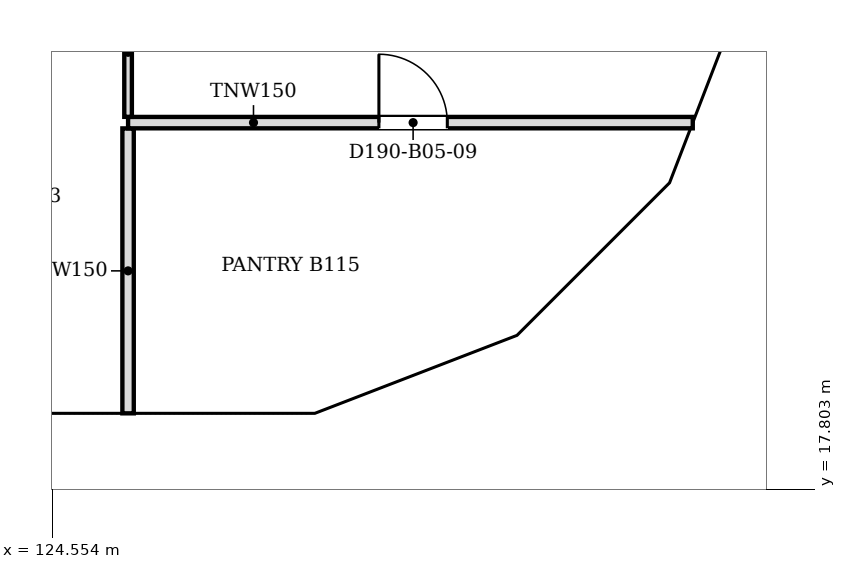
"""IFC4 building model, lengths in metres.
Left out: names, types, materials, properties, quantities, classifications, styles, units other than length and angle.
Written with IfcOpenShell. Run it as: python <this file> out.ifc"""

import sys

from ifc_helpers import new_model, si_unit, direction, frame, frame_2d, origin, place, context, subcontext, project, spatial, polyline, rectangle, outline, extrude, faceted_brep, source, transform, mapped, element, fill, save


model = new_model("IFC4")
c1 = context("Model", 3, precision=1e-05, world=origin(), true_north=direction((0.0, 1.0)))
c2 = subcontext(c1, "Body", "Model", "MODEL_VIEW")
j1 = project(units=[si_unit("LENGTHUNIT", "METRE"), si_unit("PLANEANGLEUNIT", "RADIAN")], contexts=[c1])
p1 = place(None, origin())
s1 = spatial("IfcSite", under=j1, at=p1, CompositionType="ELEMENT")
p2 = place(p1, origin())
s2 = spatial("IfcBuilding", under=s1, at=p2, CompositionType="ELEMENT")
p3 = place(p2, frame((0.0, 0.0, 48.6)))
s3 = spatial("IfcBuildingStorey", under=s2, at=p3, CompositionType="ELEMENT", Elevation=48.6)
m1 = source(origin(), c2, "Body", "SweptSolid", [
    extrude(outline(polyline([(3.05, 0.0), (6.1, 3.8), (3.05, 7.6), (0.0, 3.8), (3.05, 0.0)])), frame((0.0, 0.25, 0.0), z_axis=(0.0, -1.0, 0.0), x_axis=(1.0, 0.0, 0.0)), (0.0, 0.0, 1.0), 0.5),
])
p4 = place(p3, frame((118.95, 18.55, -3.8), z_axis=(0.0, 0.0, 1.0), x_axis=(1.0, 0.0, 0.0)))
e1 = element("IfcWall", 1, at=p4, inside=s3, PredefinedType="SOLIDWALL", context=c2, shape_type="MappedRepresentation", body=[
    mapped(m1, transform((0.0, 0.0, 0.0), scale=1.0)),
])
m2 = source(origin(), c2, "Body", "SweptSolid", [
    extrude(outline(polyline([(3.05, 0.399), (5.78, 3.8), (3.05, 7.2), (0.321, 3.8), (3.05, 0.399)])), frame((0.0, 0.26, 0.0), z_axis=(0.0, -1.0, 0.0), x_axis=(1.0, 0.0, 0.0)), (0.0, 0.0, 1.0), 0.52),
])
p5 = place(p4, origin())
e2 = element("IfcOpeningElement", 2, at=p5, cuts=e1, PredefinedType="OPENING", context=c2, shape_type="MappedRepresentation", body=[
    mapped(m2, transform((0.0, 0.0, 0.0), scale=1.0)),
])
m3 = source(origin(), c2, "Body", "Brep", [
    faceted_brep([(3.003, -0.25, 0.0), (3.05, -0.25, 0.06), (3.05, -0.25, 7.54), (3.003, -0.25, 7.6), (0.0, -0.25, 3.8), (0.0, 0.25, 3.8), (2.957, 0.25, 7.541), (2.957, 0.25, 0.059), (3.003, 0.0, 0.0), (3.003, 0.0, 7.6)], [[[0, 1, 2, 3, 4]], [[5, 6, 7]], [[1, 0, 8]], [[9, 3, 2]], [[6, 5, 4, 3, 9]], [[5, 7, 8, 0, 4]], [[1, 8, 7, 6, 9, 2]]]),
])
p6 = place(p3, frame((125.05, 18.55, -3.8), z_axis=(0.0, 0.0, 1.0), x_axis=(1.0, 0.0, 0.0)))
e3 = element("IfcWall", 3, at=p6, inside=s3, PredefinedType="SOLIDWALL", context=c2, shape_type="MappedRepresentation", body=[
    mapped(m3, transform((0.0, 0.0, 0.0), scale=1.0)),
])
m4 = source(origin(), c2, "Body", "SweptSolid", [
    extrude(outline(polyline([(2.803, 6.944), (0.319, 3.8), (2.803, 0.656), (2.803, 6.944)])), frame((0.0, 0.26, 0.0), z_axis=(0.0, -1.0, 0.0), x_axis=(1.0, 0.0, 0.0)), (0.0, 0.0, 1.0), 0.52),
])
p7 = place(p6, origin())
e4 = element("IfcOpeningElement", 4, at=p7, cuts=e3, PredefinedType="OPENING", context=c2, shape_type="MappedRepresentation", body=[
    mapped(m4, transform((0.0, 0.0, 0.0), scale=1.0)),
])
m5 = source(origin(), c2, "Body", "Brep", [
    faceted_brep([(0.047, -0.25, 0.0), (2.997, -0.25, 3.8), (0.047, -0.25, 7.6), (0.0, -0.25, 7.541), (0.0, -0.25, 0.059), (0.093, 0.25, 7.54), (2.944, 0.25, 3.868), (2.944, 0.25, 3.732), (0.093, 0.25, 0.06), (2.997, 0.0, 3.8), (0.047, 0.0, 0.0), (0.047, 0.0, 7.6)], [[[0, 1, 2, 3, 4]], [[5, 6, 7, 8]], [[8, 7, 9, 1, 0, 10]], [[6, 5, 11, 2, 1, 9]], [[3, 2, 11]], [[10, 0, 4]], [[8, 10, 4, 3, 11, 5]], [[7, 6, 9]]]),
])
p8 = place(p3, frame((128.01, 18.533, -3.8), z_axis=(0.0, 0.0, 1.0), x_axis=(0.932990326376, 0.359901446078, 0.0)))
e5 = element("IfcWall", 5, at=p8, inside=s3, PredefinedType="SOLIDWALL", context=c2, shape_type="MappedRepresentation", body=[
    mapped(m5, transform((0.0, 0.0, 0.0), scale=1.0)),
])
m6 = source(origin(), c2, "Body", "SweptSolid", [
    extrude(outline(polyline([(0.247, 0.665), (2.681, 3.8), (0.247, 6.935), (0.247, 0.665)])), frame((0.0, 0.26, 0.0), z_axis=(0.0, -1.0, 0.0), x_axis=(1.0, 0.0, 0.0)), (0.0, 0.0, 1.0), 0.52),
])
p9 = place(p8, origin())
e6 = element("IfcOpeningElement", 6, at=p9, cuts=e5, PredefinedType="OPENING", context=c2, shape_type="MappedRepresentation", body=[
    mapped(m6, transform((0.0, 0.0, 0.0), scale=1.0)),
])
m7 = source(origin(), c2, "Body", "Brep", [
    faceted_brep([(2.944, -0.25, 0.0), (2.997, -0.25, 0.068), (2.997, -0.25, 7.532), (2.944, -0.25, 7.6), (0.0, -0.25, 3.8), (0.053, 0.25, 3.868), (2.891, 0.25, 7.532), (2.891, 0.25, 0.068), (0.053, 0.25, 3.732), (2.944, 0.0, 0.0), (2.944, 0.0, 7.6), (0.0, 0.0, 3.8)], [[[0, 1, 2, 3, 4]], [[5, 6, 7, 8]], [[1, 0, 9]], [[10, 3, 2]], [[6, 5, 11, 4, 3, 10]], [[8, 7, 9, 0, 4, 11]], [[8, 11, 5]], [[1, 9, 7, 6, 10, 2]]]),
])
p10 = place(p3, frame((130.806, 19.612, -3.8), z_axis=(0.0, 0.0, 1.0), x_axis=(0.707106781187, 0.707106781187, 0.0)))
e7 = element("IfcWall", 7, at=p10, inside=s3, PredefinedType="SOLIDWALL", context=c2, shape_type="MappedRepresentation", body=[
    mapped(m7, transform((0.0, 0.0, 0.0), scale=1.0)),
])
m8 = source(origin(), c2, "Body", "SweptSolid", [
    extrude(outline(polyline([(2.744, 6.934), (0.316, 3.8), (2.744, 0.666), (2.744, 6.934)])), frame((0.0, 0.26, 0.0), z_axis=(0.0, -1.0, 0.0), x_axis=(1.0, 0.0, 0.0)), (0.0, 0.0, 1.0), 0.52),
])
p11 = place(p10, origin())
e8 = element("IfcOpeningElement", 8, at=p11, cuts=e7, PredefinedType="OPENING", context=c2, shape_type="MappedRepresentation", body=[
    mapped(m8, transform((0.0, 0.0, 0.0), scale=1.0)),
])
m9 = source(origin(), c2, "Body", "Brep", [
    faceted_brep([(0.053, -0.25, 0.0), (3.003, -0.25, 3.8), (0.053, -0.25, 7.6), (0.0, -0.25, 7.531), (0.0, -0.25, 0.068), (0.106, 0.25, 7.532), (2.957, 0.25, 3.86), (2.957, 0.25, 3.74), (0.106, 0.25, 0.068), (3.003, 0.0, 3.8), (0.053, 0.0, 0.0), (0.053, 0.0, 7.6)], [[[0, 1, 2, 3, 4]], [[5, 6, 7, 8]], [[8, 7, 9, 1, 0, 10]], [[6, 5, 11, 2, 1, 9]], [[3, 2, 11]], [[10, 0, 4]], [[8, 10, 4, 3, 11, 5]], [[7, 6, 9]]]),
])
p12 = place(p3, frame((132.869, 21.644, -3.8), z_axis=(0.0, 0.0, 1.0), x_axis=(0.359855894603, 0.933007896601, 0.0)))
e9 = element("IfcWall", 9, at=p12, inside=s3, PredefinedType="SOLIDWALL", context=c2, shape_type="MappedRepresentation", body=[
    mapped(m9, transform((0.0, 0.0, 0.0), scale=1.0)),
])
m10 = source(origin(), c2, "Body", "SweptSolid", [
    extrude(outline(polyline([(0.253, 0.665), (2.687, 3.8), (0.253, 6.935), (0.253, 0.665)])), frame((0.0, 0.26, 0.0), z_axis=(0.0, -1.0, 0.0), x_axis=(1.0, 0.0, 0.0)), (0.0, 0.0, 1.0), 0.52),
])
p13 = place(p12, origin())
e10 = element("IfcOpeningElement", 10, at=p13, cuts=e9, PredefinedType="OPENING", context=c2, shape_type="MappedRepresentation", body=[
    mapped(m10, transform((0.0, 0.0, 0.0), scale=1.0)),
])
p14 = place(p2, frame((0.0, 0.0, 52.4)))
s4 = spatial("IfcBuildingStorey", under=s2, at=p14, CompositionType="ELEMENT", Elevation=52.4)
m11 = source(origin(), c2, "Body", "Brep", [
    faceted_brep([(3.05, -0.25, 0.0), (6.053, -0.25, 3.8), (3.05, -0.25, 7.6), (0.0, -0.25, 3.8), (0.0, 0.25, 3.8), (3.05, 0.25, 7.6), (6.007, 0.25, 3.859), (6.007, 0.25, 3.741), (3.05, 0.25, 0.0), (6.053, 0.0, 3.8)], [[[0, 1, 2, 3]], [[4, 5, 6, 7, 8]], [[8, 7, 9, 1, 0]], [[6, 5, 2, 1, 9]], [[5, 4, 3, 2]], [[4, 8, 0, 3]], [[9, 7, 6]]]),
])
p15 = place(p14, frame((122.0, 18.55, -3.8), z_axis=(0.0, 0.0, 1.0), x_axis=(1.0, 0.0, 0.0)))
e11 = element("IfcWall", 11, at=p15, inside=s4, PredefinedType="SOLIDWALL", context=c2, shape_type="MappedRepresentation", body=[
    mapped(m11, transform((0.0, 0.0, 0.0), scale=1.0)),
])
m12 = source(origin(), c2, "Body", "SweptSolid", [
    extrude(outline(polyline([(3.049, 0.401), (5.735, 3.8), (3.049, 7.199), (0.321, 3.8), (3.049, 0.401)])), frame((0.0, 0.26, 0.0), z_axis=(0.0, -1.0, 0.0), x_axis=(1.0, 0.0, 0.0)), (0.0, 0.0, 1.0), 0.52),
])
p16 = place(p15, origin())
e12 = element("IfcOpeningElement", 12, at=p16, cuts=e11, PredefinedType="OPENING", context=c2, shape_type="MappedRepresentation", body=[
    mapped(m12, transform((0.0, 0.0, 0.0), scale=1.0)),
])
m13 = source(origin(), c2, "Body", "Brep", [
    faceted_brep([(2.95, -0.25, 0.0), (3.003, -0.25, 0.068), (3.003, -0.25, 7.531), (2.95, -0.25, 7.6), (0.0, -0.25, 3.8), (0.047, 0.25, 3.86), (2.898, 0.25, 7.532), (2.898, 0.25, 0.068), (0.047, 0.25, 3.74), (2.95, 0.0, 0.0), (2.95, 0.0, 7.6), (0.0, 0.0, 3.8)], [[[0, 1, 2, 3, 4]], [[5, 6, 7, 8]], [[1, 0, 9]], [[10, 3, 2]], [[6, 5, 11, 4, 3, 10]], [[8, 7, 9, 0, 4, 11]], [[8, 11, 5]], [[1, 9, 7, 6, 10, 2]]]),
])
p17 = place(p14, frame((128.053, 18.55, -3.8), z_axis=(0.0, 0.0, 1.0), x_axis=(0.933007896601, 0.359855894603, 0.0)))
e13 = element("IfcWall", 13, at=p17, inside=s4, PredefinedType="SOLIDWALL", context=c2, shape_type="MappedRepresentation", body=[
    mapped(m13, transform((0.0, 0.0, 0.0), scale=1.0)),
])
m14 = source(origin(), c2, "Body", "SweptSolid", [
    extrude(outline(polyline([(2.75, 6.935), (0.316, 3.8), (2.75, 0.665), (2.75, 6.935)])), frame((0.0, 0.26, 0.0), z_axis=(0.0, -1.0, 0.0), x_axis=(1.0, 0.0, 0.0)), (0.0, 0.0, 1.0), 0.52),
])
p18 = place(p17, origin())
e14 = element("IfcOpeningElement", 14, at=p18, cuts=e13, PredefinedType="OPENING", context=c2, shape_type="MappedRepresentation", body=[
    mapped(m14, transform((0.0, 0.0, 0.0), scale=1.0)),
])
m15 = source(origin(), c2, "Body", "Brep", [
    faceted_brep([(0.053, -0.25, 0.0), (2.997, -0.25, 3.8), (0.053, -0.25, 7.6), (0.0, -0.25, 7.532), (0.0, -0.25, 0.068), (0.106, 0.25, 7.531), (2.944, 0.25, 3.868), (2.944, 0.25, 3.732), (0.106, 0.25, 0.068), (2.997, 0.0, 3.8), (0.053, 0.0, 0.0), (0.053, 0.0, 7.6)], [[[0, 1, 2, 3, 4]], [[5, 6, 7, 8]], [[8, 7, 9, 1, 0, 10]], [[6, 5, 11, 2, 1, 9]], [[3, 2, 11]], [[10, 0, 4]], [[8, 10, 4, 3, 11, 5]], [[9, 7, 6]]]),
])
p19 = place(p14, frame((130.769, 19.574, -3.8), z_axis=(0.0, 0.0, 1.0), x_axis=(0.707106781187, 0.707106781187, 0.0)))
e15 = element("IfcWall", 15, at=p19, inside=s4, PredefinedType="SOLIDWALL", context=c2, shape_type="MappedRepresentation", body=[
    mapped(m15, transform((0.0, 0.0, 0.0), scale=1.0)),
])
m16 = source(origin(), c2, "Body", "SweptSolid", [
    extrude(outline(polyline([(0.253, 0.666), (2.681, 3.8), (0.253, 6.934), (0.253, 0.666)])), frame((0.0, 0.26, 0.0), z_axis=(0.0, -1.0, 0.0), x_axis=(1.0, 0.0, 0.0)), (0.0, 0.0, 1.0), 0.52),
])
p20 = place(p19, origin())
e16 = element("IfcOpeningElement", 16, at=p20, cuts=e15, PredefinedType="OPENING", context=c2, shape_type="MappedRepresentation", body=[
    mapped(m16, transform((0.0, 0.0, 0.0), scale=1.0)),
])
m17 = source(origin(), c2, "Body", "Brep", [
    faceted_brep([(2.95, -0.25, 0.0), (2.997, -0.25, 0.059), (2.997, -0.25, 7.541), (2.95, -0.25, 7.6), (0.0, -0.25, 3.8), (0.053, 0.25, 3.868), (2.904, 0.25, 7.54), (2.904, 0.25, 0.06), (0.053, 0.25, 3.732), (2.95, 0.0, 0.0), (2.95, 0.0, 7.6), (0.0, 0.0, 3.8)], [[[0, 1, 2, 3, 4]], [[5, 6, 7, 8]], [[1, 0, 9]], [[10, 3, 2]], [[6, 5, 11, 4, 3, 10]], [[8, 7, 9, 0, 4, 11]], [[8, 11, 5]], [[1, 9, 7, 6, 10, 2]]]),
])
p21 = place(p14, frame((132.888, 21.694, -3.8), z_axis=(0.0, 0.0, 1.0), x_axis=(0.359901446078, 0.932990326376, 0.0)))
e17 = element("IfcWall", 17, at=p21, inside=s4, PredefinedType="SOLIDWALL", context=c2, shape_type="MappedRepresentation", body=[
    mapped(m17, transform((0.0, 0.0, 0.0), scale=1.0)),
])
p22 = place(p21, origin())
e18 = element("IfcOpeningElement", 18, at=p22, cuts=e17, PredefinedType="OPENING", context=c2, shape_type="MappedRepresentation", body=[
    mapped(m14, transform((0.0, 0.0, 0.0), scale=1.0)),
])
p23 = place(p3, frame((125.55, 18.8, 0.0), z_axis=(0.0, 0.0, 1.0), x_axis=(0.0, 1.0, 0.0)))
e19 = element("IfcWall", 19, at=p23, inside=s3, PredefinedType="PARTITIONING", context=c2, shape_type="SweptSolid", body=[
    extrude(rectangle(XDim=3.749, YDim=0.15, at=frame_2d((1.875, 0.0))), origin(), (0.0, 0.0, 1.0), 3.067),
])
p24 = place(p3, frame((132.979, 22.625, 0.0), z_axis=(0.0, 0.0, 1.0), x_axis=(-1.0, 0.0, 0.0)))
e20 = element("IfcWall", 20, at=p24, inside=s3, PredefinedType="PARTITIONING", context=c2, shape_type="SweptSolid", body=[
    extrude(rectangle(XDim=7.429, YDim=0.15, at=frame_2d((3.715, 0.0))), origin(), (0.0, 0.0, 1.0), 3.067),
])
m18 = source(origin(), c2, "Body", "SweptSolid", [
    extrude(rectangle(XDim=0.9, YDim=2.1, at=frame_2d((0.45, 1.05))), frame((0.0, 0.085, 0.0), z_axis=(0.0, -1.0, 0.0), x_axis=(1.0, 0.0, 0.0)), (0.0, 0.0, 1.0), 0.17),
])
p25 = place(p24, frame((3.229, 0.0, 0.0)))
e21 = element("IfcOpeningElement", 21, at=p25, cuts=e20, PredefinedType="OPENING", context=c2, shape_type="MappedRepresentation", body=[
    mapped(m18, transform((0.0, 0.0, 0.0), scale=1.0)),
])
p26 = place(p3, frame((125.55, 22.701, 0.0), z_axis=(0.0, 0.0, 1.0), x_axis=(0.0, 1.0, 0.0)))
e22 = element("IfcWall", 22, at=p26, inside=s3, PredefinedType="PARTITIONING", context=c2, shape_type="SweptSolid", body=[
    extrude(rectangle(XDim=1.698, YDim=0.1, at=frame_2d((0.849, 0.0))), origin(), (0.0, 0.0, 1.0), 3.067),
])
m19 = source(origin(), c2, "Body", "SweptSolid", [
    extrude(rectangle(XDim=0.9, YDim=2.1, at=frame_2d((0.45, 1.05))), frame((0.0, 0.025, 0.0), z_axis=(0.0, -1.0, 0.0), x_axis=(1.0, 0.0, 0.0)), (0.0, 0.0, 1.0), 0.05),
])
p27 = place(p25, origin())
e23 = element("IfcDoor", 23, at=p27, inside=s3, OperationType="SINGLE_SWING_RIGHT", PredefinedType="DOOR", context=c2, shape_type="MappedRepresentation", body=[
    mapped(m19, transform((0.0, 0.0, 0.0), scale=1.0)),
])
fill(e21, e23)
save(model, sys.argv[1])
